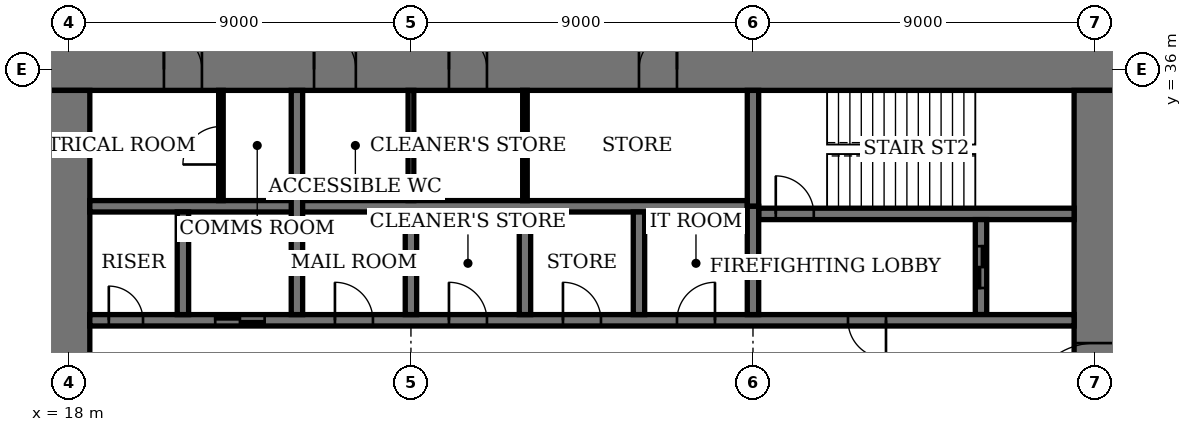
"""IFC4 building model, lengths in metres.
Left out: names, types, materials, properties, quantities, classifications, styles, units other than length and angle.
Written with IfcOpenShell. Run it as: python <this file> out.ifc"""

import sys

from ifc_helpers import new_model, si_unit, direction, frame, frame_2d, origin, place, context, subcontext, project, spatial, rectangle, extrude, element, fill, save


model = new_model("IFC4")
c1 = context("Model", 3, precision=1e-05, world=origin(), true_north=direction((0.0, 1.0)))
c2 = subcontext(c1, "Body", "Model", "MODEL_VIEW")
j1 = project(units=[si_unit("LENGTHUNIT", "METRE"), si_unit("PLANEANGLEUNIT", "RADIAN")], contexts=[c1])
p1 = place(None, origin())
s1 = spatial("IfcSite", under=j1, at=p1, CompositionType="ELEMENT")
p2 = place(p1, origin())
s2 = spatial("IfcBuilding", under=s1, at=p2, CompositionType="ELEMENT")
p3 = place(p2, frame((0.0, 0.0, 283.4)))
s3 = spatial("IfcBuildingStorey", under=s2, at=p3, CompositionType="ELEMENT", Elevation=283.4)
p4 = place(p3, frame((45.55, 36.0, 0.0), z_axis=(0.0, 0.0, 1.0), x_axis=(-1.0, 0.0, 0.0)))
e1 = element("IfcWall", 1, at=p4, inside=s3, PredefinedType="SHEAR", context=c2, shape_type="SweptSolid", body=[
    extrude(rectangle(XDim=28.1, YDim=1.1, at=frame_2d((14.05, 0.0))), origin(), (0.0, 0.0, 1.0), 4.0),
])
p5 = place(p4, frame((11.55, 0.0, 0.0)))
e2 = element("IfcOpeningElement", 2, at=p5, cuts=e1, PredefinedType="OPENING", context=c2, shape_type="SweptSolid", body=[
    extrude(rectangle(XDim=1.0, YDim=2.4, at=frame_2d((0.5, 1.2))), frame((0.0, 0.56, 0.0), z_axis=(0.0, -1.0, 0.0), x_axis=(1.0, 0.0, 0.0)), (0.0, 0.0, 1.0), 1.12),
])
p6 = place(p4, frame((16.55, 0.0, 0.0)))
e3 = element("IfcOpeningElement", 3, at=p6, cuts=e1, PredefinedType="OPENING", context=c2, shape_type="SweptSolid", body=[
    extrude(rectangle(XDim=1.0, YDim=2.4, at=frame_2d((0.5, 1.2))), frame((0.0, 0.56, 0.0), z_axis=(0.0, -1.0, 0.0), x_axis=(1.0, 0.0, 0.0)), (0.0, 0.0, 1.0), 1.12),
])
p7 = place(p4, frame((20.0, 0.0, 0.0)))
e4 = element("IfcOpeningElement", 4, at=p7, cuts=e1, PredefinedType="OPENING", context=c2, shape_type="SweptSolid", body=[
    extrude(rectangle(XDim=1.1, YDim=2.4, at=frame_2d((0.55, 1.2))), frame((0.0, 0.56, 0.0), z_axis=(0.0, -1.0, 0.0), x_axis=(1.0, 0.0, 0.0)), (0.0, 0.0, 1.0), 1.12),
])
p8 = place(p4, frame((24.05, 0.0, 0.0)))
e5 = element("IfcOpeningElement", 5, at=p8, cuts=e1, PredefinedType="OPENING", context=c2, shape_type="SweptSolid", body=[
    extrude(rectangle(XDim=1.0, YDim=2.4, at=frame_2d((0.5, 1.2))), frame((0.0, 0.56, 0.0), z_axis=(0.0, -1.0, 0.0), x_axis=(1.0, 0.0, 0.0)), (0.0, 0.0, 1.0), 1.12),
])
p9 = place(p3, frame((18.0, 35.45, 0.0), z_axis=(0.0, 0.0, 1.0), x_axis=(0.0, -1.0, 0.0)))
e6 = element("IfcWall", 6, at=p9, inside=s3, PredefinedType="SHEAR", context=c2, shape_type="SweptSolid", body=[
    extrude(rectangle(XDim=16.9, YDim=1.1, at=frame_2d((8.45, 0.0))), origin(), (0.0, 0.0, 1.0), 4.0),
])
p10 = place(p9, frame((8.45, 0.0, 0.0)))
e7 = element("IfcOpeningElement", 7, at=p10, cuts=e6, PredefinedType="OPENING", context=c2, shape_type="SweptSolid", body=[
    extrude(rectangle(XDim=1.8, YDim=2.4, at=frame_2d((0.9, 1.2))), frame((0.0, 0.56, 0.0), z_axis=(0.0, -1.0, 0.0), x_axis=(1.0, 0.0, 0.0)), (0.0, 0.0, 1.0), 1.12),
])
p11 = place(p3, frame((45.0, 18.55, 0.0), z_axis=(0.0, 0.0, 1.0), x_axis=(0.0, 1.0, 0.0)))
e8 = element("IfcWall", 8, at=p11, inside=s3, PredefinedType="SHEAR", context=c2, shape_type="SweptSolid", body=[
    extrude(rectangle(XDim=16.9, YDim=1.1, at=frame_2d((8.45, 0.0))), origin(), (0.0, 0.0, 1.0), 4.0),
])
p12 = place(p11, frame((8.45, 0.0, 0.0)))
e9 = element("IfcOpeningElement", 9, at=p12, cuts=e8, PredefinedType="OPENING", context=c2, shape_type="SweptSolid", body=[
    extrude(rectangle(XDim=1.8, YDim=2.4, at=frame_2d((0.9, 1.2))), frame((0.0, 0.56, 0.0), z_axis=(0.0, -1.0, 0.0), x_axis=(1.0, 0.0, 0.0)), (0.0, 0.0, 1.0), 1.12),
])
p13 = place(p3, frame((36.15, 32.2, 0.0), z_axis=(0.0, 0.0, 1.0), x_axis=(1.0, 0.0, 0.0)))
e10 = element("IfcWall", 10, at=p13, inside=s3, PredefinedType="SHEAR", context=c2, shape_type="SweptSolid", body=[
    extrude(rectangle(XDim=8.3, YDim=0.3, at=frame_2d((4.15, 0.0))), origin(), (0.0, 0.0, 1.0), 4.0),
])
p14 = place(p13, frame((0.45, 0.0, 0.0)))
e11 = element("IfcOpeningElement", 11, at=p14, cuts=e10, PredefinedType="OPENING", context=c2, shape_type="SweptSolid", body=[
    extrude(rectangle(XDim=1.0, YDim=2.4, at=frame_2d((0.5, 1.2))), frame((0.0, 0.16, 0.0), z_axis=(0.0, -1.0, 0.0), x_axis=(1.0, 0.0, 0.0)), (0.0, 0.0, 1.0), 0.32),
])
p15 = place(p3, frame((36.0, 32.4, 0.0), z_axis=(0.0, 0.0, 1.0), x_axis=(0.0, 1.0, 0.0)))
e12 = element("IfcWall", 12, at=p15, inside=s3, PredefinedType="SHEAR", context=c2, shape_type="SweptSolid", body=[
    extrude(rectangle(XDim=3.05, YDim=0.3, at=frame_2d((1.525, 0.0))), origin(), (0.0, 0.0, 1.0), 4.0),
])
p16 = place(p3, frame((42.0, 29.55, 0.0), z_axis=(0.0, 0.0, 1.0), x_axis=(0.0, 1.0, 0.0)))
e13 = element("IfcWall", 13, at=p16, inside=s3, PredefinedType="SHEAR", context=c2, shape_type="SweptSolid", body=[
    extrude(rectangle(XDim=2.5, YDim=0.3, at=frame_2d((1.25, 0.0))), origin(), (0.0, 0.0, 1.0), 4.0),
])
p17 = place(p16, frame((0.7, 0.0, 0.0)))
e14 = element("IfcOpeningElement", 14, at=p17, cuts=e13, PredefinedType="OPENING", context=c2, shape_type="SweptSolid", body=[
    extrude(rectangle(XDim=1.1, YDim=2.4, at=frame_2d((0.55, 1.2))), frame((0.0, 0.16, 0.0), z_axis=(0.0, -1.0, 0.0), x_axis=(1.0, 0.0, 0.0)), (0.0, 0.0, 1.0), 0.32),
])
p18 = place(p3, frame((18.55, 29.4, 0.0), z_axis=(0.0, 0.0, 1.0), x_axis=(1.0, 0.0, 0.0)))
e15 = element("IfcWall", 15, at=p18, inside=s3, PredefinedType="SHEAR", context=c2, shape_type="SweptSolid", body=[
    extrude(rectangle(XDim=25.9, YDim=0.3, at=frame_2d((12.95, 0.0))), origin(), (0.0, 0.0, 1.0), 4.0),
])
p19 = place(p18, frame((19.95, 0.0, 0.0)))
e16 = element("IfcOpeningElement", 16, at=p19, cuts=e15, PredefinedType="OPENING", context=c2, shape_type="SweptSolid", body=[
    extrude(rectangle(XDim=1.0, YDim=2.4, at=frame_2d((0.5, 1.2))), frame((0.0, 0.16, 0.0), z_axis=(0.0, -1.0, 0.0), x_axis=(1.0, 0.0, 0.0)), (0.0, 0.0, 1.0), 0.32),
])
p20 = place(p18, frame((0.5, 0.0, 0.0)))
e17 = element("IfcOpeningElement", 17, at=p20, cuts=e15, PredefinedType="OPENING", context=c2, shape_type="SweptSolid", body=[
    extrude(rectangle(XDim=0.9, YDim=2.1, at=frame_2d((0.45, 1.05))), frame((0.0, 0.16, 0.0), z_axis=(0.0, -1.0, 0.0), x_axis=(1.0, 0.0, 0.0)), (0.0, 0.0, 1.0), 0.32),
])
p21 = place(p18, frame((15.45, 0.0, 0.0)))
e18 = element("IfcOpeningElement", 18, at=p21, cuts=e15, PredefinedType="OPENING", context=c2, shape_type="SweptSolid", body=[
    extrude(rectangle(XDim=1.0, YDim=2.4, at=frame_2d((0.5, 1.2))), frame((0.0, 0.16, 0.0), z_axis=(0.0, -1.0, 0.0), x_axis=(1.0, 0.0, 0.0)), (0.0, 0.0, 1.0), 0.32),
])
p22 = place(p18, frame((12.45, 0.0, 0.0)))
e19 = element("IfcOpeningElement", 19, at=p22, cuts=e15, PredefinedType="OPENING", context=c2, shape_type="SweptSolid", body=[
    extrude(rectangle(XDim=1.0, YDim=2.4, at=frame_2d((0.5, 1.2))), frame((0.0, 0.16, 0.0), z_axis=(0.0, -1.0, 0.0), x_axis=(1.0, 0.0, 0.0)), (0.0, 0.0, 1.0), 0.32),
])
p23 = place(p18, frame((9.45, 0.0, 0.0)))
e20 = element("IfcOpeningElement", 20, at=p23, cuts=e15, PredefinedType="OPENING", context=c2, shape_type="SweptSolid", body=[
    extrude(rectangle(XDim=1.0, YDim=2.4, at=frame_2d((0.5, 1.2))), frame((0.0, 0.16, 0.0), z_axis=(0.0, -1.0, 0.0), x_axis=(1.0, 0.0, 0.0)), (0.0, 0.0, 1.0), 0.32),
])
p24 = place(p18, frame((6.45, 0.0, 0.0)))
e21 = element("IfcOpeningElement", 21, at=p24, cuts=e15, PredefinedType="OPENING", context=c2, shape_type="SweptSolid", body=[
    extrude(rectangle(XDim=1.0, YDim=2.4, at=frame_2d((0.5, 1.2))), frame((0.0, 0.16, 0.0), z_axis=(0.0, -1.0, 0.0), x_axis=(1.0, 0.0, 0.0)), (0.0, 0.0, 1.0), 0.32),
])
p25 = place(p18, frame((3.3, 0.0, 0.0)))
e22 = element("IfcOpeningElement", 22, at=p25, cuts=e15, PredefinedType="OPENING", context=c2, shape_type="SweptSolid", body=[
    extrude(rectangle(XDim=1.3, YDim=2.4, at=frame_2d((0.65, 1.2))), frame((0.0, 0.16, 0.0), z_axis=(0.0, -1.0, 0.0), x_axis=(1.0, 0.0, 0.0)), (0.0, 0.0, 1.0), 0.32),
])
p26 = place(p3, frame((18.55, 32.4, 0.0), z_axis=(0.0, 0.0, 1.0), x_axis=(1.0, 0.0, 0.0)))
e23 = element("IfcWall", 23, at=p26, inside=s3, PredefinedType="SHEAR", context=c2, shape_type="SweptSolid", body=[
    extrude(rectangle(XDim=17.3, YDim=0.3, at=frame_2d((8.65, 0.0))), origin(), (0.0, 0.0, 1.0), 4.0),
])
for number, where, z_axis, x_axis in (
    (24, (33.0, 29.55, 0.0), (0.0, 0.0, 1.0), (0.0, 1.0, 0.0)),
    (25, (30.0, 29.55, 0.0), (0.0, 0.0, 1.0), (0.0, 1.0, 0.0)),
    (26, (27.0, 29.55, 0.0), (0.0, 0.0, 1.0), (0.0, 1.0, 0.0)),
):
    element("IfcWall", number, at=place(p3, frame(where, z_axis=z_axis, x_axis=x_axis)), inside=s3, PredefinedType="SHEAR", context=c2, shape_type="SweptSolid", body=[
        extrude(rectangle(XDim=2.7, YDim=0.3, at=frame_2d((1.35, 0.0))), origin(), (0.0, 0.0, 1.0), 4.0),
    ])
p27 = place(p3, frame((24.0, 29.55, 0.0), z_axis=(0.0, 0.0, 1.0), x_axis=(0.0, 1.0, 0.0)))
e27 = element("IfcWall", 27, at=p27, inside=s3, PredefinedType="SHEAR", context=c2, shape_type="SweptSolid", body=[
    extrude(rectangle(XDim=5.9, YDim=0.3, at=frame_2d((2.95, 0.0))), origin(), (0.0, 0.0, 1.0), 4.0),
])
p28 = place(p3, frame((21.0, 29.55, 0.0), z_axis=(0.0, 0.0, 1.0), x_axis=(0.0, 1.0, 0.0)))
e28 = element("IfcWall", 28, at=p28, inside=s3, PredefinedType="SHEAR", context=c2, shape_type="SweptSolid", body=[
    extrude(rectangle(XDim=2.7, YDim=0.3, at=frame_2d((1.35, 0.0))), origin(), (0.0, 0.0, 1.0), 4.0),
])
p29 = place(p3, frame((36.0, 29.55, 0.0), z_axis=(0.0, 0.0, 1.0), x_axis=(0.0, 1.0, 0.0)))
e29 = element("IfcWall", 29, at=p29, inside=s3, PredefinedType="SHEAR", context=c2, shape_type="SweptSolid", body=[
    extrude(rectangle(XDim=2.85, YDim=0.3, at=frame_2d((1.425, 0.0))), origin(), (0.0, 0.0, 1.0), 4.0),
])
p30 = place(p3, frame((30.0, 32.55, 0.0), z_axis=(0.0, 0.0, 1.0), x_axis=(0.0, 1.0, 0.0)))
e30 = element("IfcWall", 30, at=p30, inside=s3, PredefinedType="PARTITIONING", context=c2, shape_type="SweptSolid", body=[
    extrude(rectangle(XDim=2.9, YDim=0.12, at=frame_2d((1.45, 0.0))), origin(), (0.0, 0.0, 1.0), 3.75),
])
p31 = place(p3, frame((27.0, 32.55, 0.0), z_axis=(0.0, 0.0, 1.0), x_axis=(0.0, 1.0, 0.0)))
e31 = element("IfcWall", 31, at=p31, inside=s3, PredefinedType="PARTITIONING", context=c2, shape_type="SweptSolid", body=[
    extrude(rectangle(XDim=2.9, YDim=0.15, at=frame_2d((1.45, 0.0))), origin(), (0.0, 0.0, 1.0), 3.75),
])
p32 = place(p3, frame((22.0, 32.55, 0.0), z_axis=(0.0, 0.0, 1.0), x_axis=(0.0, 1.0, 0.0)))
e32 = element("IfcWall", 32, at=p32, inside=s3, PredefinedType="PARTITIONING", context=c2, shape_type="SweptSolid", body=[
    extrude(rectangle(XDim=2.9, YDim=0.12, at=frame_2d((1.45, 0.0))), origin(), (0.0, 0.0, 1.0), 3.75),
])
p33 = place(p32, frame((0.95, 0.0, 0.0)))
e33 = element("IfcOpeningElement", 33, at=p33, cuts=e32, PredefinedType="OPENING", context=c2, shape_type="SweptSolid", body=[
    extrude(rectangle(XDim=1.0, YDim=2.4, at=frame_2d((0.5, 1.2))), frame((0.0, 0.07, 0.0), z_axis=(0.0, -1.0, 0.0), x_axis=(1.0, 0.0, 0.0)), (0.0, 0.0, 1.0), 0.14),
])
p34 = place(p12, origin())
e34 = element("IfcDoor", 34, at=p34, inside=s3, OperationType="DOUBLE_DOOR_DOUBLE_SWING", PredefinedType="DOOR", context=c2, shape_type="SweptSolid", body=[
    extrude(rectangle(XDim=1.8, YDim=2.4, at=frame_2d((0.9, 1.2))), frame((0.0, 0.03, 0.0), z_axis=(0.0, -1.0, 0.0), x_axis=(1.0, 0.0, 0.0)), (0.0, 0.0, 1.0), 0.06),
    extrude(rectangle(XDim=0.04, YDim=2.4, at=frame_2d((0.02, 1.2))), frame((0.0, 0.55, 0.0), z_axis=(0.0, -1.0, 0.0), x_axis=(1.0, 0.0, 0.0)), (0.0, 0.0, 1.0), 1.1),
    extrude(rectangle(XDim=0.04, YDim=2.4, at=frame_2d((1.78, 1.2))), frame((0.0, 0.55, 0.0), z_axis=(0.0, -1.0, 0.0), x_axis=(1.0, 0.0, 0.0)), (0.0, 0.0, 1.0), 1.1),
    extrude(rectangle(XDim=1.8, YDim=0.04, at=frame_2d((0.9, 2.38))), frame((0.0, 0.55, 0.0), z_axis=(0.0, -1.0, 0.0), x_axis=(1.0, 0.0, 0.0)), (0.0, 0.0, 1.0), 1.1),
])
fill(e9, e34)
p35 = place(p5, origin())
e35 = element("IfcDoor", 35, at=p35, inside=s3, OperationType="SINGLE_SWING_LEFT", PredefinedType="DOOR", context=c2, shape_type="SweptSolid", body=[
    extrude(rectangle(XDim=1.0, YDim=2.4, at=frame_2d((0.5, 1.2))), frame((0.0, 0.025, 0.0), z_axis=(0.0, -1.0, 0.0), x_axis=(1.0, 0.0, 0.0)), (0.0, 0.0, 1.0), 0.05),
    extrude(rectangle(XDim=0.04, YDim=2.4, at=frame_2d((0.02, 1.2))), frame((0.0, 0.4, 0.0), z_axis=(0.0, -1.0, 0.0), x_axis=(1.0, 0.0, 0.0)), (0.0, 0.0, 1.0), 0.8),
    extrude(rectangle(XDim=0.04, YDim=2.4, at=frame_2d((0.98, 1.2))), frame((0.0, 0.4, 0.0), z_axis=(0.0, -1.0, 0.0), x_axis=(1.0, 0.0, 0.0)), (0.0, 0.0, 1.0), 0.8),
    extrude(rectangle(XDim=1.0, YDim=0.04, at=frame_2d((0.5, 2.38))), frame((0.0, 0.4, 0.0), z_axis=(0.0, -1.0, 0.0), x_axis=(1.0, 0.0, 0.0)), (0.0, 0.0, 1.0), 0.8),
])
fill(e2, e35)
p36 = place(p6, origin())
e36 = element("IfcDoor", 36, at=p36, inside=s3, OperationType="SINGLE_SWING_RIGHT", PredefinedType="DOOR", context=c2, shape_type="SweptSolid", body=[
    extrude(rectangle(XDim=1.0, YDim=2.4, at=frame_2d((0.5, 1.2))), frame((0.0, 0.025, 0.0), z_axis=(0.0, -1.0, 0.0), x_axis=(1.0, 0.0, 0.0)), (0.0, 0.0, 1.0), 0.05),
    extrude(rectangle(XDim=0.04, YDim=2.4, at=frame_2d((0.02, 1.2))), frame((0.0, 0.4, 0.0), z_axis=(0.0, -1.0, 0.0), x_axis=(1.0, 0.0, 0.0)), (0.0, 0.0, 1.0), 0.8),
    extrude(rectangle(XDim=0.04, YDim=2.4, at=frame_2d((0.98, 1.2))), frame((0.0, 0.4, 0.0), z_axis=(0.0, -1.0, 0.0), x_axis=(1.0, 0.0, 0.0)), (0.0, 0.0, 1.0), 0.8),
    extrude(rectangle(XDim=1.0, YDim=0.04, at=frame_2d((0.5, 2.38))), frame((0.0, 0.4, 0.0), z_axis=(0.0, -1.0, 0.0), x_axis=(1.0, 0.0, 0.0)), (0.0, 0.0, 1.0), 0.8),
])
fill(e3, e36)
p37 = place(p7, origin())
e37 = element("IfcDoor", 37, at=p37, inside=s3, OperationType="SINGLE_SWING_RIGHT", PredefinedType="DOOR", context=c2, shape_type="SweptSolid", body=[
    extrude(rectangle(XDim=1.1, YDim=2.4, at=frame_2d((0.55, 1.2))), frame((0.0, 0.025, 0.0), z_axis=(0.0, -1.0, 0.0), x_axis=(1.0, 0.0, 0.0)), (0.0, 0.0, 1.0), 0.05),
    extrude(rectangle(XDim=0.04, YDim=2.4, at=frame_2d((0.02, 1.2))), frame((0.0, 0.44, 0.0), z_axis=(0.0, -1.0, 0.0), x_axis=(1.0, 0.0, 0.0)), (0.0, 0.0, 1.0), 0.88),
    extrude(rectangle(XDim=0.04, YDim=2.4, at=frame_2d((1.08, 1.2))), frame((0.0, 0.44, 0.0), z_axis=(0.0, -1.0, 0.0), x_axis=(1.0, 0.0, 0.0)), (0.0, 0.0, 1.0), 0.88),
    extrude(rectangle(XDim=1.1, YDim=0.04, at=frame_2d((0.55, 2.38))), frame((0.0, 0.44, 0.0), z_axis=(0.0, -1.0, 0.0), x_axis=(1.0, 0.0, 0.0)), (0.0, 0.0, 1.0), 0.88),
])
fill(e4, e37)
p38 = place(p8, origin())
e38 = element("IfcDoor", 38, at=p38, inside=s3, OperationType="SINGLE_SWING_RIGHT", PredefinedType="DOOR", context=c2, shape_type="SweptSolid", body=[
    extrude(rectangle(XDim=1.0, YDim=2.4, at=frame_2d((0.5, 1.2))), frame((0.0, 0.025, 0.0), z_axis=(0.0, -1.0, 0.0), x_axis=(1.0, 0.0, 0.0)), (0.0, 0.0, 1.0), 0.05),
    extrude(rectangle(XDim=0.04, YDim=2.4, at=frame_2d((0.02, 1.2))), frame((0.0, 0.4, 0.0), z_axis=(0.0, -1.0, 0.0), x_axis=(1.0, 0.0, 0.0)), (0.0, 0.0, 1.0), 0.8),
    extrude(rectangle(XDim=0.04, YDim=2.4, at=frame_2d((0.98, 1.2))), frame((0.0, 0.4, 0.0), z_axis=(0.0, -1.0, 0.0), x_axis=(1.0, 0.0, 0.0)), (0.0, 0.0, 1.0), 0.8),
    extrude(rectangle(XDim=1.0, YDim=0.04, at=frame_2d((0.5, 2.38))), frame((0.0, 0.4, 0.0), z_axis=(0.0, -1.0, 0.0), x_axis=(1.0, 0.0, 0.0)), (0.0, 0.0, 1.0), 0.8),
])
fill(e5, e38)
p39 = place(p14, origin())
e39 = element("IfcDoor", 39, at=p39, inside=s3, OperationType="SINGLE_SWING_RIGHT", PredefinedType="DOOR", context=c2, shape_type="SweptSolid", body=[
    extrude(rectangle(XDim=1.0, YDim=2.4, at=frame_2d((0.5, 1.2))), frame((0.0, 0.03, 0.0), z_axis=(0.0, -1.0, 0.0), x_axis=(1.0, 0.0, 0.0)), (0.0, 0.0, 1.0), 0.06),
])
fill(e11, e39)
p40 = place(p19, origin())
e40 = element("IfcDoor", 40, at=p40, inside=s3, OperationType="SINGLE_SWING_RIGHT", PredefinedType="DOOR", context=c2, shape_type="SweptSolid", body=[
    extrude(rectangle(XDim=1.0, YDim=2.4, at=frame_2d((0.5, 1.2))), frame((0.0, 0.03, 0.0), z_axis=(0.0, -1.0, 0.0), x_axis=(1.0, 0.0, 0.0)), (0.0, 0.0, 1.0), 0.06),
])
fill(e16, e40)
p41 = place(p20, origin())
e41 = element("IfcDoor", 41, at=p41, inside=s3, OperationType="SINGLE_SWING_RIGHT", PredefinedType="DOOR", context=c2, shape_type="SweptSolid", body=[
    extrude(rectangle(XDim=0.9, YDim=2.1, at=frame_2d((0.45, 1.05))), frame((0.0, 0.03, 0.0), z_axis=(0.0, -1.0, 0.0), x_axis=(1.0, 0.0, 0.0)), (0.0, 0.0, 1.0), 0.06),
])
fill(e17, e41)
p42 = place(p33, origin())
e42 = element("IfcDoor", 42, at=p42, inside=s3, OperationType="SINGLE_SWING_RIGHT", PredefinedType="DOOR", context=c2, shape_type="SweptSolid", body=[
    extrude(rectangle(XDim=1.0, YDim=2.4, at=frame_2d((0.5, 1.2))), frame((0.0, 0.03, 0.0), z_axis=(0.0, -1.0, 0.0), x_axis=(1.0, 0.0, 0.0)), (0.0, 0.0, 1.0), 0.06),
])
fill(e33, e42)
p43 = place(p21, origin())
e43 = element("IfcDoor", 43, at=p43, inside=s3, OperationType="SINGLE_SWING_LEFT", PredefinedType="DOOR", context=c2, shape_type="SweptSolid", body=[
    extrude(rectangle(XDim=1.0, YDim=2.4, at=frame_2d((0.5, 1.2))), frame((0.0, 0.03, 0.0), z_axis=(0.0, -1.0, 0.0), x_axis=(1.0, 0.0, 0.0)), (0.0, 0.0, 1.0), 0.06),
])
fill(e18, e43)
p44 = place(p22, origin())
e44 = element("IfcDoor", 44, at=p44, inside=s3, OperationType="SINGLE_SWING_RIGHT", PredefinedType="DOOR", context=c2, shape_type="SweptSolid", body=[
    extrude(rectangle(XDim=1.0, YDim=2.4, at=frame_2d((0.5, 1.2))), frame((0.0, 0.03, 0.0), z_axis=(0.0, -1.0, 0.0), x_axis=(1.0, 0.0, 0.0)), (0.0, 0.0, 1.0), 0.06),
])
fill(e19, e44)
p45 = place(p23, origin())
e45 = element("IfcDoor", 45, at=p45, inside=s3, OperationType="SINGLE_SWING_RIGHT", PredefinedType="DOOR", context=c2, shape_type="SweptSolid", body=[
    extrude(rectangle(XDim=1.0, YDim=2.4, at=frame_2d((0.5, 1.2))), frame((0.0, 0.03, 0.0), z_axis=(0.0, -1.0, 0.0), x_axis=(1.0, 0.0, 0.0)), (0.0, 0.0, 1.0), 0.06),
])
fill(e20, e45)
p46 = place(p24, origin())
e46 = element("IfcDoor", 46, at=p46, inside=s3, OperationType="SINGLE_SWING_RIGHT", PredefinedType="DOOR", context=c2, shape_type="SweptSolid", body=[
    extrude(rectangle(XDim=1.0, YDim=2.4, at=frame_2d((0.5, 1.2))), frame((0.0, 0.03, 0.0), z_axis=(0.0, -1.0, 0.0), x_axis=(1.0, 0.0, 0.0)), (0.0, 0.0, 1.0), 0.06),
])
fill(e21, e46)
p47 = place(p25, origin())
e47 = element("IfcDoor", 47, at=p47, inside=s3, OperationType="DOUBLE_DOOR_SLIDING", PredefinedType="DOOR", context=c2, shape_type="SweptSolid", body=[
    extrude(rectangle(XDim=1.3, YDim=2.4, at=frame_2d((0.65, 1.2))), frame((0.0, 0.02, 0.0), z_axis=(0.0, -1.0, 0.0), x_axis=(1.0, 0.0, 0.0)), (0.0, 0.0, 1.0), 0.04),
])
fill(e22, e47)
p48 = place(p17, origin())
e48 = element("IfcDoor", 48, at=p48, inside=s3, OperationType="DOUBLE_DOOR_SLIDING", PredefinedType="DOOR", context=c2, shape_type="SweptSolid", body=[
    extrude(rectangle(XDim=1.1, YDim=2.4, at=frame_2d((0.55, 1.2))), frame((0.0, 0.03, 0.0), z_axis=(0.0, -1.0, 0.0), x_axis=(1.0, 0.0, 0.0)), (0.0, 0.0, 1.0), 0.06),
])
fill(e14, e48)
save(model, sys.argv[1])
